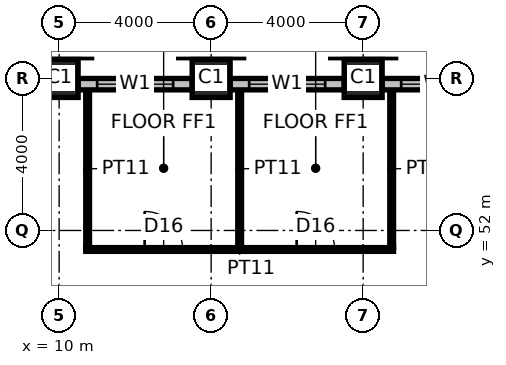
"""IFC4 building model, lengths in metres.
Left out: names, types, materials, properties, quantities, classifications, styles, units other than length and angle.
Written with IfcOpenShell. Run it as: python <this file> out.ifc"""

import sys

from ifc_helpers import new_model, si_unit, direction, frame, frame_2d, origin, origin_2d, place, context, subcontext, project, spatial, rectangle, hollow_rectangle, extrude, element, fill, save


model = new_model("IFC4")
c1 = context("Model", 3, precision=1e-05, world=origin(), true_north=direction((0.0, 1.0)))
c2 = subcontext(c1, "Body", "Model", "MODEL_VIEW")
j1 = project(units=[si_unit("LENGTHUNIT", "METRE"), si_unit("PLANEANGLEUNIT", "RADIAN")], contexts=[c1])
p1 = place(None, origin())
s1 = spatial("IfcSite", under=j1, at=p1, CompositionType="ELEMENT")
p2 = place(p1, origin())
s2 = spatial("IfcBuilding", under=s1, at=p2, CompositionType="ELEMENT")
p3 = place(p2, frame((0.0, 0.0, 175.8)))
s3 = spatial("IfcBuildingStorey", under=s2, at=p3, CompositionType="ELEMENT", Elevation=175.8)
for number, where, z_axis, x_axis in (
    (1, (10.0, 56.0, 0.0), (0.0, 0.0, 1.0), (1.0, 0.0, 0.0)),
    (2, (14.0, 56.0, 0.0), (0.0, 0.0, 1.0), (1.0, 0.0, 0.0)),
    (3, (18.0, 56.0, 0.0), (0.0, 0.0, 1.0), (1.0, 0.0, 0.0)),
):
    element("IfcColumn", number, at=place(p3, frame(where, z_axis=z_axis, x_axis=x_axis)), inside=s3, PredefinedType="COLUMN", context=c2, shape_type="SweptSolid", body=[
        extrude(hollow_rectangle(XDim=1.0, YDim=1.0, WallThickness=0.1, at=origin_2d()), origin(), (0.0, 0.0, 1.0), 4.0),
    ])
p4 = place(p3, frame((10.7, 51.5, 0.0), z_axis=(0.0, 0.0, 1.0), x_axis=(1.0, 0.0, 0.0)))
e4 = element("IfcWall", 4, at=p4, inside=s3, PredefinedType="PARTITIONING", context=c2, shape_type="SweptSolid", body=[
    extrude(rectangle(XDim=8.1, YDim=0.1, at=frame_2d((4.05, 0.0))), origin(), (0.0, 0.0, 1.0), 3.85),
])
p5 = place(p4, frame((1.55, 0.0, 0.0)))
e5 = element("IfcOpeningElement", 5, at=p5, cuts=e4, PredefinedType="OPENING", context=c2, shape_type="SweptSolid", body=[
    extrude(rectangle(XDim=1.0, YDim=2.2, at=frame_2d((0.5, 1.1))), frame((0.0, 0.06, 0.0), z_axis=(0.0, -1.0, 0.0), x_axis=(1.0, 0.0, 0.0)), (0.0, 0.0, 1.0), 0.12),
])
p6 = place(p4, frame((5.55, 0.0, 0.0)))
e6 = element("IfcOpeningElement", 6, at=p6, cuts=e4, PredefinedType="OPENING", context=c2, shape_type="SweptSolid", body=[
    extrude(rectangle(XDim=1.0, YDim=2.2, at=frame_2d((0.5, 1.1))), frame((0.0, 0.06, 0.0), z_axis=(0.0, -1.0, 0.0), x_axis=(1.0, 0.0, 0.0)), (0.0, 0.0, 1.0), 0.12),
])
for number, where, z_axis, x_axis in (
    (7, (10.75, 51.55, 0.0), (0.0, 0.0, 1.0), (0.0, 1.0, 0.0)),
    (8, (14.75, 51.55, 0.0), (0.0, 0.0, 1.0), (0.0, 1.0, 0.0)),
    (9, (18.75, 51.55, 0.0), (0.0, 0.0, 1.0), (0.0, 1.0, 0.0)),
):
    element("IfcWall", number, at=place(p3, frame(where, z_axis=z_axis, x_axis=x_axis)), inside=s3, PredefinedType="PARTITIONING", context=c2, shape_type="SweptSolid", body=[
        extrude(rectangle(XDim=4.15, YDim=0.1, at=frame_2d((2.075, 0.0))), origin(), (0.0, 0.0, 1.0), 3.85),
    ])
p7 = place(p3, frame((13.5, 55.85, 0.0), z_axis=(0.0, 0.0, 1.0), x_axis=(-1.0, 0.0, 0.0)))
e10 = element("IfcWall", 10, at=p7, inside=s3, PredefinedType="ELEMENTEDWALL", context=c2, shape_type="SweptSolid", body=[
    extrude(rectangle(XDim=3.0, YDim=0.3, at=frame_2d((1.5, 0.0))), origin(), (0.0, 0.0, 1.0), 2.85),
])
p8 = place(p7, frame((0.5, 0.0, 0.8)))
e11 = element("IfcOpeningElement", 11, at=p8, cuts=e10, PredefinedType="OPENING", context=c2, shape_type="SweptSolid", body=[
    extrude(rectangle(XDim=2.0, YDim=2.0, at=frame_2d((1.0, 1.0))), frame((0.0, 0.16, 0.0), z_axis=(0.0, -1.0, 0.0), x_axis=(1.0, 0.0, 0.0)), (0.0, 0.0, 1.0), 0.32),
])
p9 = place(p3, frame((17.5, 55.85, 0.0), z_axis=(0.0, 0.0, 1.0), x_axis=(-1.0, 0.0, 0.0)))
e12 = element("IfcWall", 12, at=p9, inside=s3, PredefinedType="ELEMENTEDWALL", context=c2, shape_type="SweptSolid", body=[
    extrude(rectangle(XDim=3.0, YDim=0.3, at=frame_2d((1.5, 0.0))), origin(), (0.0, 0.0, 1.0), 2.85),
])
p10 = place(p9, frame((0.5, 0.0, 0.8)))
e13 = element("IfcOpeningElement", 13, at=p10, cuts=e12, PredefinedType="OPENING", context=c2, shape_type="SweptSolid", body=[
    extrude(rectangle(XDim=2.0, YDim=2.0, at=frame_2d((1.0, 1.0))), frame((0.0, 0.16, 0.0), z_axis=(0.0, -1.0, 0.0), x_axis=(1.0, 0.0, 0.0)), (0.0, 0.0, 1.0), 0.32),
])
p11 = place(p3, frame((21.5, 55.85, 0.0), z_axis=(0.0, 0.0, 1.0), x_axis=(-1.0, 0.0, 0.0)))
e14 = element("IfcWall", 14, at=p11, inside=s3, PredefinedType="ELEMENTEDWALL", context=c2, shape_type="SweptSolid", body=[
    extrude(rectangle(XDim=3.0, YDim=0.3, at=frame_2d((1.5, 0.0))), origin(), (0.0, 0.0, 1.0), 2.85),
])
p12 = place(p11, frame((0.5, 0.0, 0.8)))
e15 = element("IfcOpeningElement", 15, at=p12, cuts=e14, PredefinedType="OPENING", context=c2, shape_type="SweptSolid", body=[
    extrude(rectangle(XDim=2.0, YDim=2.0, at=frame_2d((1.0, 1.0))), frame((0.0, 0.16, 0.0), z_axis=(0.0, -1.0, 0.0), x_axis=(1.0, 0.0, 0.0)), (0.0, 0.0, 1.0), 0.32),
])
p13 = place(p5, origin())
e16 = element("IfcDoor", 16, at=p13, inside=s3, OperationType="SINGLE_SWING_LEFT", PredefinedType="DOOR", context=c2, shape_type="SweptSolid", body=[
    extrude(rectangle(XDim=1.0, YDim=2.2, at=frame_2d((0.5, 1.1))), frame((0.0, 0.025, 0.0), z_axis=(0.0, -1.0, 0.0), x_axis=(1.0, 0.0, 0.0)), (0.0, 0.0, 1.0), 0.05),
])
fill(e5, e16)
p14 = place(p6, origin())
e17 = element("IfcDoor", 17, at=p14, inside=s3, OperationType="SINGLE_SWING_LEFT", PredefinedType="DOOR", context=c2, shape_type="SweptSolid", body=[
    extrude(rectangle(XDim=1.0, YDim=2.2, at=frame_2d((0.5, 1.1))), frame((0.0, 0.025, 0.0), z_axis=(0.0, -1.0, 0.0), x_axis=(1.0, 0.0, 0.0)), (0.0, 0.0, 1.0), 0.05),
])
fill(e6, e17)
p15 = place(p8, origin())
e18 = element("IfcWindow", 18, at=p15, inside=s3, PartitioningType="SINGLE_PANEL", PredefinedType="WINDOW", context=c2, shape_type="SweptSolid", body=[
    extrude(rectangle(XDim=2.0, YDim=2.0, at=frame_2d((1.0, 1.0))), frame((0.0, 0.03, 0.0), z_axis=(0.0, -1.0, 0.0), x_axis=(1.0, 0.0, 0.0)), (0.0, 0.0, 1.0), 0.06),
])
fill(e11, e18)
p16 = place(p10, origin())
e19 = element("IfcWindow", 19, at=p16, inside=s3, PartitioningType="SINGLE_PANEL", PredefinedType="WINDOW", context=c2, shape_type="SweptSolid", body=[
    extrude(rectangle(XDim=2.0, YDim=2.0, at=frame_2d((1.0, 1.0))), frame((0.0, 0.03, 0.0), z_axis=(0.0, -1.0, 0.0), x_axis=(1.0, 0.0, 0.0)), (0.0, 0.0, 1.0), 0.06),
])
fill(e13, e19)
p17 = place(p12, origin())
e20 = element("IfcWindow", 20, at=p17, inside=s3, PartitioningType="SINGLE_PANEL", PredefinedType="WINDOW", context=c2, shape_type="SweptSolid", body=[
    extrude(rectangle(XDim=2.0, YDim=2.0, at=frame_2d((1.0, 1.0))), frame((0.0, 0.03, 0.0), z_axis=(0.0, -1.0, 0.0), x_axis=(1.0, 0.0, 0.0)), (0.0, 0.0, 1.0), 0.06),
])
fill(e15, e20)
save(model, sys.argv[1])
